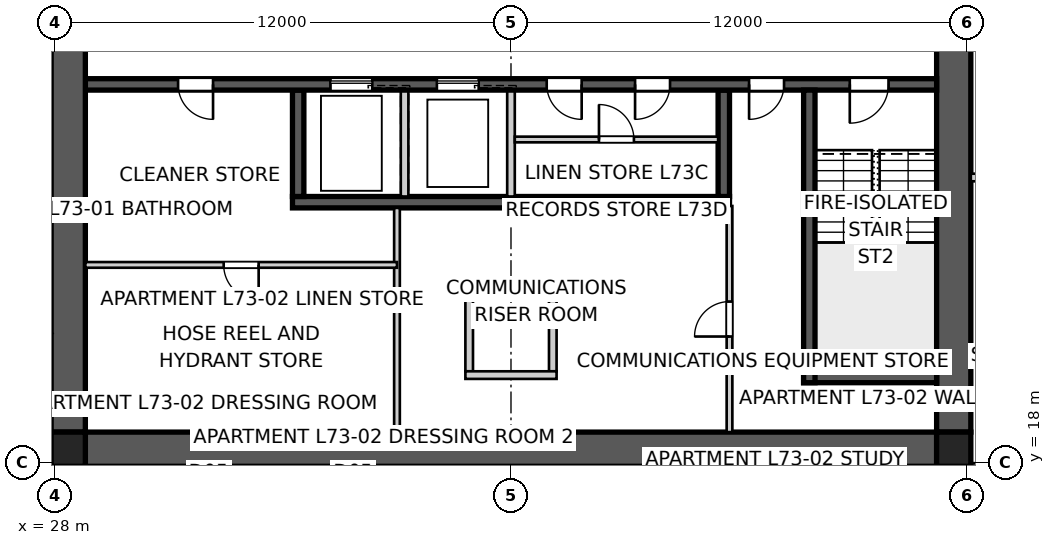
"""IFC4 building model, lengths in metres.
Left out: names, types, materials, properties, quantities, classifications, styles, units other than length and angle.
Written with IfcOpenShell. Run it as: python <this file> out.ifc"""

import sys

from ifc_helpers import new_model, si_unit, direction, frame, frame_2d, origin, origin_2d, place, context, subcontext, project, spatial, polyline, rectangle, outline, extrude, element, fill, save


model = new_model("IFC4")
c1 = context("Model", 3, precision=1e-05, world=origin(), true_north=direction((0.0, 1.0)))
c2 = subcontext(c1, "Body", "Model", "MODEL_VIEW")
j1 = project(units=[si_unit("LENGTHUNIT", "METRE"), si_unit("PLANEANGLEUNIT", "RADIAN")], contexts=[c1])
p1 = place(None, origin())
s1 = spatial("IfcSite", under=j1, at=p1, CompositionType="ELEMENT")
p2 = place(p1, origin())
s2 = spatial("IfcBuilding", under=s1, at=p2, CompositionType="ELEMENT")
p3 = place(p2, frame((0.0, 0.0, 264.2)))
s3 = spatial("IfcBuildingStorey", under=s2, at=p3, CompositionType="ELEMENT", Elevation=264.2)
p4 = place(p3, frame((51.2, 18.35, 0.0), z_axis=(0.0, 0.0, 1.0), x_axis=(-1.0, 0.0, 0.0)))
e1 = element("IfcWall", 1, at=p4, inside=s3, PredefinedType="SHEAR", context=c2, shape_type="SweptSolid", body=[
    extrude(outline(polyline([(0.0, -0.45), (22.4, -0.45), (22.4, -0.025), (22.85, -0.025), (22.85, 0.025), (22.4, 0.025), (22.4, 0.45), (0.0, 0.45), (0.0, 0.025), (-0.45, 0.025), (-0.45, -0.025), (0.0, -0.025), (0.0, -0.45)])), origin(), (0.0, 0.0, 1.0), 3.4),
])
p5 = place(p3, frame((51.65, 18.8, 0.0), z_axis=(0.0, 0.0, 1.0), x_axis=(0.0, 1.0, 0.0)))
e2 = element("IfcWall", 2, at=p5, inside=s3, PredefinedType="SHEAR", context=c2, shape_type="SweptSolid", body=[
    extrude(outline(polyline([(0.0, -0.45), (22.4, -0.45), (22.4, -0.025), (22.85, -0.025), (22.85, 0.025), (22.4, 0.025), (22.4, 0.45), (0.0, 0.45), (0.0, 0.025), (-0.45, 0.025), (-0.45, -0.025), (0.0, -0.025), (0.0, -0.45)])), origin(), (0.0, 0.0, 1.0), 3.4),
])
p6 = place(p5, frame((11.14, 0.0, 0.0)))
e3 = element("IfcOpeningElement", 3, at=p6, cuts=e2, PredefinedType="OPENING", context=c2, shape_type="SweptSolid", body=[
    extrude(rectangle(XDim=1.02, YDim=2.4, at=frame_2d((0.51, 1.2))), frame((0.0, 0.46, 0.0), z_axis=(0.0, -1.0, 0.0), x_axis=(1.0, 0.0, 0.0)), (0.0, 0.0, 1.0), 0.92),
])
p7 = place(p3, frame((28.35, 41.2, 0.0), z_axis=(0.0, 0.0, 1.0), x_axis=(0.0, -1.0, 0.0)))
e4 = element("IfcWall", 4, at=p7, inside=s3, PredefinedType="SHEAR", context=c2, shape_type="SweptSolid", body=[
    extrude(outline(polyline([(0.0, -0.45), (22.4, -0.45), (22.4, -0.025), (22.85, -0.025), (22.85, 0.025), (22.4, 0.025), (22.4, 0.45), (0.0, 0.45), (0.0, 0.025), (-0.45, 0.025), (-0.45, -0.025), (0.0, -0.025), (0.0, -0.45)])), origin(), (0.0, 0.0, 1.0), 3.4),
])
p8 = place(p7, frame((11.14, 0.0, 0.0)))
e5 = element("IfcOpeningElement", 5, at=p8, cuts=e4, PredefinedType="OPENING", context=c2, shape_type="SweptSolid", body=[
    extrude(rectangle(XDim=1.02, YDim=2.4, at=frame_2d((0.51, 1.2))), frame((0.0, 0.46, 0.0), z_axis=(0.0, -1.0, 0.0), x_axis=(1.0, 0.0, 0.0)), (0.0, 0.0, 1.0), 0.92),
])
p9 = place(p3, frame((51.2, 27.95, 0.0), z_axis=(0.0, 0.0, 1.0), x_axis=(-1.0, 0.0, 0.0)))
e6 = element("IfcWall", 6, at=p9, inside=s3, PredefinedType="SHEAR", context=c2, shape_type="SweptSolid", body=[
    extrude(rectangle(XDim=22.4, YDim=0.3, at=frame_2d((11.2, 0.0))), origin(), (0.0, 0.0, 1.0), 3.4),
])
p10 = place(p9, frame((19.04, 0.0, 0.0)))
e7 = element("IfcOpeningElement", 7, at=p10, cuts=e6, PredefinedType="OPENING", context=c2, shape_type="SweptSolid", body=[
    extrude(rectangle(XDim=0.92, YDim=2.1, at=frame_2d((0.46, 1.05))), frame((0.0, 0.16, 0.0), z_axis=(0.0, -1.0, 0.0), x_axis=(1.0, 0.0, 0.0)), (0.0, 0.0, 1.0), 0.32),
])
p11 = place(p9, frame((1.265, 0.0, 0.0)))
e8 = element("IfcOpeningElement", 8, at=p11, cuts=e6, PredefinedType="OPENING", context=c2, shape_type="SweptSolid", body=[
    extrude(rectangle(XDim=1.02, YDim=2.1, at=frame_2d((0.51, 1.05))), frame((0.0, 0.16, 0.0), z_axis=(0.0, -1.0, 0.0), x_axis=(1.0, 0.0, 0.0)), (0.0, 0.0, 1.0), 0.32),
])
p12 = place(p9, frame((4.015, 0.0, 0.0)))
e9 = element("IfcOpeningElement", 9, at=p12, cuts=e6, PredefinedType="OPENING", context=c2, shape_type="SweptSolid", body=[
    extrude(rectangle(XDim=0.92, YDim=2.1, at=frame_2d((0.46, 1.05))), frame((0.0, 0.16, 0.0), z_axis=(0.0, -1.0, 0.0), x_axis=(1.0, 0.0, 0.0)), (0.0, 0.0, 1.0), 0.32),
])
p13 = place(p9, frame((9.34, 0.0, 0.0)))
e10 = element("IfcOpeningElement", 10, at=p13, cuts=e6, PredefinedType="OPENING", context=c2, shape_type="SweptSolid", body=[
    extrude(rectangle(XDim=0.92, YDim=2.1, at=frame_2d((0.46, 1.05))), frame((0.0, 0.16, 0.0), z_axis=(0.0, -1.0, 0.0), x_axis=(1.0, 0.0, 0.0)), (0.0, 0.0, 1.0), 0.32),
])
p14 = place(p9, frame((7.015, 0.0, 0.0)))
e11 = element("IfcOpeningElement", 11, at=p14, cuts=e6, PredefinedType="OPENING", context=c2, shape_type="SweptSolid", body=[
    extrude(rectangle(XDim=0.92, YDim=2.1, at=frame_2d((0.46, 1.05))), frame((0.0, 0.16, 0.0), z_axis=(0.0, -1.0, 0.0), x_axis=(1.0, 0.0, 0.0)), (0.0, 0.0, 1.0), 0.32),
])
p15 = place(p9, frame((12.05, 0.0, 0.0)))
e12 = element("IfcOpeningElement", 12, at=p15, cuts=e6, PredefinedType="OPENING", context=c2, shape_type="SweptSolid", body=[
    extrude(rectangle(XDim=1.1, YDim=2.1, at=frame_2d((0.55, 1.05))), frame((0.0, 0.16, 0.0), z_axis=(0.0, -1.0, 0.0), x_axis=(1.0, 0.0, 0.0)), (0.0, 0.0, 1.0), 0.32),
])
p16 = place(p9, frame((14.85, 0.0, 0.0)))
e13 = element("IfcOpeningElement", 13, at=p16, cuts=e6, PredefinedType="OPENING", context=c2, shape_type="SweptSolid", body=[
    extrude(rectangle(XDim=1.1, YDim=2.1, at=frame_2d((0.55, 1.05))), frame((0.0, 0.16, 0.0), z_axis=(0.0, -1.0, 0.0), x_axis=(1.0, 0.0, 0.0)), (0.0, 0.0, 1.0), 0.32),
])
p17 = place(p3, frame((45.75, 24.85, 0.0), z_axis=(0.0, 0.0, 1.0), x_axis=(-1.0, 0.0, 0.0)))
e14 = element("IfcWall", 14, at=p17, inside=s3, PredefinedType="SHEAR", context=c2, shape_type="SweptSolid", body=[
    extrude(rectangle(XDim=11.5, YDim=0.3, at=frame_2d((5.75, 0.0))), origin(), (0.0, 0.0, 1.0), 3.4),
])
p18 = place(p3, frame((45.6, 27.8, 0.0), z_axis=(0.0, 0.0, 1.0), x_axis=(0.0, -1.0, 0.0)))
e15 = element("IfcWall", 15, at=p18, inside=s3, PredefinedType="SHEAR", context=c2, shape_type="SweptSolid", body=[
    extrude(rectangle(XDim=2.8, YDim=0.3, at=frame_2d((1.4, 0.0))), origin(), (0.0, 0.0, 1.0), 3.4),
])
for number, where, z_axis, x_axis in (
    (16, (40.0, 27.8, 0.0), (0.0, 0.0, 1.0), (0.0, -1.0, 0.0)),
    (17, (37.2, 27.8, 0.0), (0.0, 0.0, 1.0), (0.0, -1.0, 0.0)),
):
    element("IfcWall", number, at=place(p3, frame(where, z_axis=z_axis, x_axis=x_axis)), inside=s3, PredefinedType="SOLIDWALL", context=c2, shape_type="SweptSolid", body=[
        extrude(rectangle(XDim=2.8, YDim=0.2, at=frame_2d((1.4, 0.0))), origin(), (0.0, 0.0, 1.0), 3.4),
    ])
p19 = place(p3, frame((34.4, 27.8, 0.0), z_axis=(0.0, 0.0, 1.0), x_axis=(0.0, -1.0, 0.0)))
e18 = element("IfcWall", 18, at=p19, inside=s3, PredefinedType="SHEAR", context=c2, shape_type="SweptSolid", body=[
    extrude(rectangle(XDim=2.8, YDim=0.3, at=frame_2d((1.4, 0.0))), origin(), (0.0, 0.0, 1.0), 3.4),
])
p20 = place(p3, frame((47.85, 27.8, 0.0), z_axis=(0.0, 0.0, 1.0), x_axis=(0.0, -1.0, 0.0)))
e19 = element("IfcWall", 19, at=p20, inside=s3, PredefinedType="SHEAR", context=c2, shape_type="SweptSolid", body=[
    extrude(rectangle(XDim=7.7, YDim=0.3, at=frame_2d((3.85, 0.0))), origin(), (0.0, 0.0, 1.0), 3.4),
])
p21 = place(p3, frame((51.2, 20.25, 0.0), z_axis=(0.0, 0.0, 1.0), x_axis=(-1.0, 0.0, 0.0)))
e20 = element("IfcWall", 20, at=p21, inside=s3, PredefinedType="SHEAR", context=c2, shape_type="SweptSolid", body=[
    extrude(rectangle(XDim=3.5, YDim=0.3, at=frame_2d((1.75, 0.0))), origin(), (0.0, 0.0, 1.0), 3.4),
])
for number, where, z_axis, x_axis in (
    (21, (38.9, 22.4, 0.0), (0.0, 0.0, 1.0), (0.0, -1.0, 0.0)),
    (22, (41.1, 22.4, 0.0), (0.0, 0.0, 1.0), (0.0, -1.0, 0.0)),
):
    element("IfcWall", number, at=place(p3, frame(where, z_axis=z_axis, x_axis=x_axis)), inside=s3, PredefinedType="SOLIDWALL", context=c2, shape_type="SweptSolid", body=[
        extrude(rectangle(XDim=2.0, YDim=0.2, at=frame_2d((1.0, 0.0))), origin(), (0.0, 0.0, 1.0), 3.4),
    ])
for number, where, z_axis, x_axis in (
    (23, (38.8, 22.5, 0.0), (0.0, 0.0, 1.0), (1.0, 0.0, 0.0)),
    (24, (38.8, 20.3, 0.0), (0.0, 0.0, 1.0), (1.0, 0.0, 0.0)),
):
    element("IfcWall", number, at=place(p3, frame(where, z_axis=z_axis, x_axis=x_axis)), inside=s3, PredefinedType="SOLIDWALL", context=c2, shape_type="SweptSolid", body=[
        extrude(rectangle(XDim=2.4, YDim=0.2, at=frame_2d((1.2, 0.0))), origin(), (0.0, 0.0, 1.0), 3.4),
    ])
for number, where, z_axis, x_axis in (
    (25, (28.35, 18.35, 0.0), (0.0, 0.0, 1.0), (1.0, 0.0, 0.0)),
    (26, (51.65, 18.35, 0.0), (0.0, 0.0, 1.0), (1.0, 0.0, 0.0)),
):
    element("IfcColumn", number, at=place(p3, frame(where, z_axis=z_axis, x_axis=x_axis)), inside=s3, PredefinedType="COLUMN", context=c2, shape_type="SweptSolid", body=[
        extrude(rectangle(XDim=0.9, YDim=0.9, at=origin_2d()), origin(), (0.0, 0.0, 1.0), 3.4),
    ])
p22 = place(p3, frame((52.1, 25.5, 0.0), z_axis=(0.0, 0.0, 1.0), x_axis=(1.0, 0.0, 0.0)))
e27 = element("IfcWall", 27, at=p22, inside=s3, PredefinedType="PARTITIONING", context=c2, shape_type="SweptSolid", body=[
    extrude(rectangle(XDim=2.5, YDim=0.2, at=frame_2d((1.25, 0.0))), origin(), (0.0, 0.0, 1.0), 3.2),
])
p23 = place(p3, frame((22.388, 17.668, 0.0), z_axis=(0.0, 0.0, 1.0), x_axis=(0.819161528122, 0.573562891796, 0.0)))
e28 = element("IfcWall", 28, at=p23, inside=s3, PredefinedType="PARTITIONING", context=c2, shape_type="SweptSolid", body=[
    extrude(rectangle(XDim=6.681, YDim=0.25, at=frame_2d((3.341, 0.0))), origin(), (0.0, 0.0, 1.0), 3.2),
])
p24 = place(p3, frame((45.75, 18.8, 0.0), z_axis=(0.0, 0.0, 1.0), x_axis=(0.0, 1.0, 0.0)))
e29 = element("IfcWall", 29, at=p24, inside=s3, PredefinedType="SOLIDWALL", context=c2, shape_type="SweptSolid", body=[
    extrude(rectangle(XDim=5.95, YDim=0.15, at=frame_2d((2.975, 0.0))), origin(), (0.0, 0.0, 1.0), 3.2),
])
p25 = place(p24, frame((2.515, 0.0, 0.0)))
e30 = element("IfcOpeningElement", 30, at=p25, cuts=e29, PredefinedType="OPENING", context=c2, shape_type="SweptSolid", body=[
    extrude(rectangle(XDim=0.92, YDim=2.1, at=frame_2d((0.46, 1.05))), frame((0.0, 0.085, 0.0), z_axis=(0.0, -1.0, 0.0), x_axis=(1.0, 0.0, 0.0)), (0.0, 0.0, 1.0), 0.17),
])
p26 = place(p3, frame((37.0, 18.8, 0.0), z_axis=(0.0, 0.0, 1.0), x_axis=(0.0, 1.0, 0.0)))
e31 = element("IfcWall", 31, at=p26, inside=s3, PredefinedType="SOLIDWALL", context=c2, shape_type="SweptSolid", body=[
    extrude(rectangle(XDim=5.9, YDim=0.15, at=frame_2d((2.95, 0.0))), origin(), (0.0, 0.0, 1.0), 3.2),
])
p27 = place(p3, frame((37.0, 23.2, 0.0), z_axis=(0.0, 0.0, 1.0), x_axis=(-1.0, 0.0, 0.0)))
e32 = element("IfcWall", 32, at=p27, inside=s3, PredefinedType="SOLIDWALL", context=c2, shape_type="SweptSolid", body=[
    extrude(rectangle(XDim=8.2, YDim=0.15, at=frame_2d((4.1, 0.0))), origin(), (0.0, 0.0, 1.0), 3.2),
])
p28 = place(p27, frame((3.64, 0.0, 0.0)))
e33 = element("IfcOpeningElement", 33, at=p28, cuts=e32, PredefinedType="OPENING", context=c2, shape_type="SweptSolid", body=[
    extrude(rectangle(XDim=0.92, YDim=2.1, at=frame_2d((0.46, 1.05))), frame((0.0, 0.085, 0.0), z_axis=(0.0, -1.0, 0.0), x_axis=(1.0, 0.0, 0.0)), (0.0, 0.0, 1.0), 0.17),
])
p29 = place(p3, frame((24.437, 14.812, 0.0), z_axis=(0.0, 0.0, 1.0), x_axis=(0.819157353031, 0.573568854608, 0.0)))
e34 = element("IfcWall", 34, at=p29, inside=s3, PredefinedType="PARTITIONING", context=c2, shape_type="SweptSolid", body=[
    extrude(rectangle(XDim=5.384, YDim=0.12, at=frame_2d((2.692, 0.0))), origin(), (0.0, 0.0, 1.0), 3.2),
])
p30 = place(p29, frame((2.192, 0.0, 0.0)))
e35 = element("IfcOpeningElement", 35, at=p30, cuts=e34, PredefinedType="OPENING", context=c2, shape_type="SweptSolid", body=[
    extrude(rectangle(XDim=0.96, YDim=2.1, at=frame_2d((0.48, 1.05))), frame((0.0, 0.07, 0.0), z_axis=(0.0, -1.0, 0.0), x_axis=(1.0, 0.0, 0.0)), (0.0, 0.0, 1.0), 0.14),
])
p31 = place(p3, frame((52.05, 17.9, 0.0), z_axis=(0.0, 0.0, 1.0), x_axis=(1.0, 0.0, 0.0)))
e36 = element("IfcWall", 36, at=p31, inside=s3, PredefinedType="SOLIDWALL", context=c2, shape_type="SweptSolid", body=[
    extrude(rectangle(XDim=0.444, YDim=0.15, at=frame_2d((0.222, 0.0))), origin(), (0.0, 0.0, 1.0), 3.2),
])
p32 = place(p3, frame((40.1, 26.5, 0.0), z_axis=(0.0, 0.0, 1.0), x_axis=(1.0, 0.0, 0.0)))
e37 = element("IfcWall", 37, at=p32, inside=s3, PredefinedType="SOLIDWALL", context=c2, shape_type="SweptSolid", body=[
    extrude(rectangle(XDim=5.35, YDim=0.15, at=frame_2d((2.675, 0.0))), origin(), (0.0, 0.0, 1.0), 3.2),
])
p33 = place(p32, frame((2.215, 0.0, 0.0)))
e38 = element("IfcOpeningElement", 38, at=p33, cuts=e37, PredefinedType="OPENING", context=c2, shape_type="SweptSolid", body=[
    extrude(rectangle(XDim=0.92, YDim=2.1, at=frame_2d((0.46, 1.05))), frame((0.0, 0.085, 0.0), z_axis=(0.0, -1.0, 0.0), x_axis=(1.0, 0.0, 0.0)), (0.0, 0.0, 1.0), 0.17),
])
p34 = place(p10, origin())
e39 = element("IfcDoor", 39, at=p34, inside=s3, OperationType="SINGLE_SWING_LEFT", PredefinedType="DOOR", context=c2, shape_type="SweptSolid", body=[
    extrude(rectangle(XDim=0.92, YDim=2.1, at=frame_2d((0.46, 1.05))), frame((0.0, 0.025, 0.0), z_axis=(0.0, -1.0, 0.0), x_axis=(1.0, 0.0, 0.0)), (0.0, 0.0, 1.0), 0.05),
])
fill(e7, e39)
p35 = place(p11, origin())
e40 = element("IfcDoor", 40, at=p35, inside=s3, OperationType="SINGLE_SWING_RIGHT", PredefinedType="DOOR", context=c2, shape_type="SweptSolid", body=[
    extrude(rectangle(XDim=1.02, YDim=2.1, at=frame_2d((0.51, 1.05))), frame((0.0, 0.025, 0.0), z_axis=(0.0, -1.0, 0.0), x_axis=(1.0, 0.0, 0.0)), (0.0, 0.0, 1.0), 0.05),
])
fill(e8, e40)
p36 = place(p12, origin())
e41 = element("IfcDoor", 41, at=p36, inside=s3, OperationType="SINGLE_SWING_RIGHT", PredefinedType="DOOR", context=c2, shape_type="SweptSolid", body=[
    extrude(rectangle(XDim=0.92, YDim=2.1, at=frame_2d((0.46, 1.05))), frame((0.0, 0.025, 0.0), z_axis=(0.0, -1.0, 0.0), x_axis=(1.0, 0.0, 0.0)), (0.0, 0.0, 1.0), 0.05),
])
fill(e9, e41)
p37 = place(p28, origin())
e42 = element("IfcDoor", 42, at=p37, inside=s3, OperationType="SINGLE_SWING_LEFT", PredefinedType="DOOR", context=c2, shape_type="SweptSolid", body=[
    extrude(rectangle(XDim=0.92, YDim=2.1, at=frame_2d((0.46, 1.05))), frame((0.0, 0.025, 0.0), z_axis=(0.0, -1.0, 0.0), x_axis=(1.0, 0.0, 0.0)), (0.0, 0.0, 1.0), 0.05),
])
fill(e33, e42)
p38 = place(p25, origin())
e43 = element("IfcDoor", 43, at=p38, inside=s3, OperationType="SINGLE_SWING_LEFT", PredefinedType="DOOR", context=c2, shape_type="SweptSolid", body=[
    extrude(rectangle(XDim=0.92, YDim=2.1, at=frame_2d((0.46, 1.05))), frame((0.0, 0.025, 0.0), z_axis=(0.0, -1.0, 0.0), x_axis=(1.0, 0.0, 0.0)), (0.0, 0.0, 1.0), 0.05),
])
fill(e30, e43)
p39 = place(p13, origin())
e44 = element("IfcDoor", 44, at=p39, inside=s3, OperationType="SINGLE_SWING_LEFT", PredefinedType="DOOR", context=c2, shape_type="SweptSolid", body=[
    extrude(rectangle(XDim=0.92, YDim=2.1, at=frame_2d((0.46, 1.05))), frame((0.0, 0.025, 0.0), z_axis=(0.0, -1.0, 0.0), x_axis=(1.0, 0.0, 0.0)), (0.0, 0.0, 1.0), 0.05),
])
fill(e10, e44)
p40 = place(p14, origin())
e45 = element("IfcDoor", 45, at=p40, inside=s3, OperationType="SINGLE_SWING_RIGHT", PredefinedType="DOOR", context=c2, shape_type="SweptSolid", body=[
    extrude(rectangle(XDim=0.92, YDim=2.1, at=frame_2d((0.46, 1.05))), frame((0.0, 0.025, 0.0), z_axis=(0.0, -1.0, 0.0), x_axis=(1.0, 0.0, 0.0)), (0.0, 0.0, 1.0), 0.05),
])
fill(e11, e45)
p41 = place(p33, origin())
e46 = element("IfcDoor", 46, at=p41, inside=s3, OperationType="SINGLE_SWING_LEFT", PredefinedType="DOOR", context=c2, shape_type="SweptSolid", body=[
    extrude(rectangle(XDim=0.92, YDim=2.1, at=frame_2d((0.46, 1.05))), frame((0.0, 0.025, 0.0), z_axis=(0.0, -1.0, 0.0), x_axis=(1.0, 0.0, 0.0)), (0.0, 0.0, 1.0), 0.05),
])
fill(e38, e46)
p42 = place(p15, origin())
e47 = element("IfcDoor", 47, at=p42, inside=s3, OperationType="SLIDING_TO_LEFT", PredefinedType="DOOR", context=c2, shape_type="SweptSolid", body=[
    extrude(rectangle(XDim=1.1, YDim=2.1, at=frame_2d((0.55, 1.05))), frame((0.0, 0.025, 0.0), z_axis=(0.0, -1.0, 0.0), x_axis=(1.0, 0.0, 0.0)), (0.0, 0.0, 1.0), 0.05),
])
fill(e12, e47)
p43 = place(p16, origin())
e48 = element("IfcDoor", 48, at=p43, inside=s3, OperationType="SLIDING_TO_LEFT", PredefinedType="DOOR", context=c2, shape_type="SweptSolid", body=[
    extrude(rectangle(XDim=1.1, YDim=2.1, at=frame_2d((0.55, 1.05))), frame((0.0, 0.025, 0.0), z_axis=(0.0, -1.0, 0.0), x_axis=(1.0, 0.0, 0.0)), (0.0, 0.0, 1.0), 0.05),
])
fill(e13, e48)
save(model, sys.argv[1])
